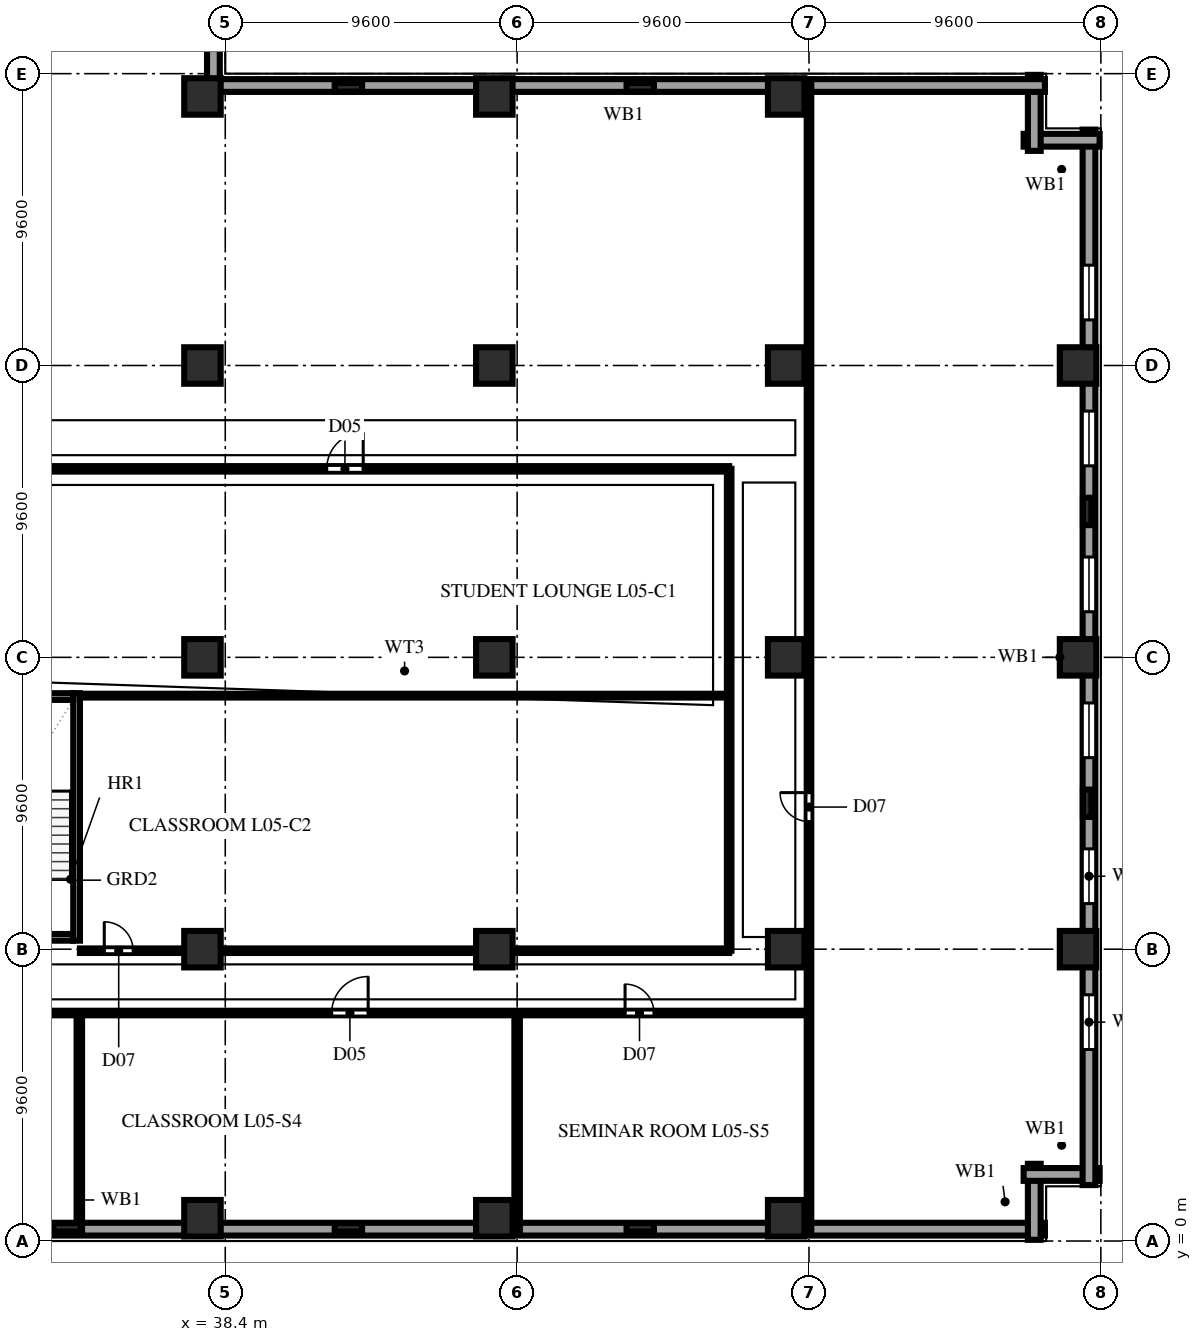
"""IFC4 building model, lengths in metres.
Left out: names, types, materials, properties, quantities, classifications, styles, units other than length and angle.
Written with IfcOpenShell. Run it as: python <this file> out.ifc"""

import sys

from ifc_helpers import new_model, si_unit, direction, frame, frame_2d, origin, origin_2d, place, context, subcontext, project, spatial, rectangle, extrude, element, fill, save


model = new_model("IFC4")
c1 = context("Model", 3, precision=1e-05, world=origin(), true_north=direction((0.0, 1.0)))
c2 = subcontext(c1, "Body", "Model", "MODEL_VIEW")
j1 = project(units=[si_unit("LENGTHUNIT", "METRE"), si_unit("PLANEANGLEUNIT", "RADIAN")], contexts=[c1])
p1 = place(None, origin())
s1 = spatial("IfcSite", under=j1, at=p1, CompositionType="ELEMENT")
p2 = place(p1, origin())
s2 = spatial("IfcBuilding", under=s1, at=p2, CompositionType="ELEMENT")
p3 = place(p2, frame((0.0, 0.0, 24.2)))
s3 = spatial("IfcBuildingStorey", under=s2, at=p3, CompositionType="ELEMENT", Elevation=24.2)
for number, where, z_axis, x_axis in (
    (1, (37.65, 0.75, 0.0), (0.0, 0.0, 1.0), (1.0, 0.0, 0.0)),
    (2, (37.65, 9.6, 0.0), (0.0, 0.0, 1.0), (1.0, 0.0, 0.0)),
    (3, (37.65, 19.2, 0.0), (0.0, 0.0, 1.0), (1.0, 0.0, 0.0)),
    (4, (37.65, 28.8, 0.0), (0.0, 0.0, 1.0), (1.0, 0.0, 0.0)),
    (5, (37.65, 37.65, 0.0), (0.0, 0.0, 1.0), (1.0, 0.0, 0.0)),
    (6, (47.25, 0.75, 0.0), (0.0, 0.0, 1.0), (1.0, 0.0, 0.0)),
    (7, (47.25, 9.6, 0.0), (0.0, 0.0, 1.0), (1.0, 0.0, 0.0)),
    (8, (47.25, 19.2, 0.0), (0.0, 0.0, 1.0), (1.0, 0.0, 0.0)),
    (9, (47.25, 28.8, 0.0), (0.0, 0.0, 1.0), (1.0, 0.0, 0.0)),
    (10, (47.25, 37.65, 0.0), (0.0, 0.0, 1.0), (1.0, 0.0, 0.0)),
    (11, (56.85, 0.75, 0.0), (0.0, 0.0, 1.0), (1.0, 0.0, 0.0)),
    (12, (56.85, 9.6, 0.0), (0.0, 0.0, 1.0), (1.0, 0.0, 0.0)),
    (13, (56.85, 19.2, 0.0), (0.0, 0.0, 1.0), (1.0, 0.0, 0.0)),
    (14, (56.85, 28.8, 0.0), (0.0, 0.0, 1.0), (1.0, 0.0, 0.0)),
    (15, (56.85, 37.65, 0.0), (0.0, 0.0, 1.0), (1.0, 0.0, 0.0)),
    (16, (66.45, 9.6, 0.0), (0.0, 0.0, 1.0), (1.0, 0.0, 0.0)),
    (17, (66.45, 19.2, 0.0), (0.0, 0.0, 1.0), (1.0, 0.0, 0.0)),
    (18, (66.45, 28.8, 0.0), (0.0, 0.0, 1.0), (1.0, 0.0, 0.0)),
):
    element("IfcColumn", number, at=place(p3, frame(where, z_axis=z_axis, x_axis=x_axis)), inside=s3, PredefinedType="COLUMN", context=c2, shape_type="SweptSolid", body=[
        extrude(rectangle(XDim=1.2, YDim=1.2, at=origin_2d()), origin(), (0.0, 0.0, 1.0), 3.8),
    ])
for number, where, z_axis, x_axis in (
    (19, (33.2, 0.45, 0.0), (0.0, 0.0, 1.0), (1.0, 0.0, 0.0)),
    (20, (42.45, 0.45, 0.0), (0.0, 0.0, 1.0), (1.0, 0.0, 0.0)),
    (21, (52.05, 0.45, 0.0), (0.0, 0.0, 1.0), (1.0, 0.0, 0.0)),
    (22, (66.75, 14.4, 0.0), (0.0, 0.0, 1.0), (0.0, 1.0, 0.0)),
    (23, (66.75, 24.0, 0.0), (0.0, 0.0, 1.0), (0.0, 1.0, 0.0)),
    (24, (42.45, 37.95, 0.0), (0.0, 0.0, 1.0), (1.0, 0.0, 0.0)),
    (25, (52.05, 37.95, 0.0), (0.0, 0.0, 1.0), (1.0, 0.0, 0.0)),
):
    element("IfcColumn", number, at=place(p3, frame(where, z_axis=z_axis, x_axis=x_axis)), inside=s3, PredefinedType="PILASTER", context=c2, shape_type="SweptSolid", body=[
        extrude(rectangle(XDim=0.9, YDim=0.28, at=origin_2d()), origin(), (0.0, 0.0, 1.0), 3.8),
    ])
p4 = place(p3, frame((1.84, 0.39, 0.0), z_axis=(0.0, 0.0, 1.0), x_axis=(1.0, 0.0, 0.0)))
e26 = element("IfcWall", 26, at=p4, inside=s3, PredefinedType="SOLIDWALL", context=c2, shape_type="SweptSolid", body=[
    extrude(rectangle(XDim=63.52, YDim=0.42, at=frame_2d((31.76, 0.0))), origin(), (0.0, 0.0, 1.0), 3.54),
])
p5 = place(p4, frame((4.16, 0.0, 0.85)))
e27 = element("IfcOpeningElement", 27, at=p5, cuts=e26, PredefinedType="OPENING", context=c2, shape_type="SweptSolid", body=[
    extrude(rectangle(XDim=2.4, YDim=1.85, at=frame_2d((1.2, 0.925))), frame((0.0, 0.222, 0.0), z_axis=(0.0, -1.0, 0.0), x_axis=(1.0, 0.0, 0.0)), (0.0, 0.0, 1.0), 0.444),
])
p6 = place(p4, frame((8.96, 0.0, 0.85)))
e28 = element("IfcOpeningElement", 28, at=p6, cuts=e26, PredefinedType="OPENING", context=c2, shape_type="SweptSolid", body=[
    extrude(rectangle(XDim=2.4, YDim=1.85, at=frame_2d((1.2, 0.925))), frame((0.0, 0.222, 0.0), z_axis=(0.0, -1.0, 0.0), x_axis=(1.0, 0.0, 0.0)), (0.0, 0.0, 1.0), 0.444),
])
p7 = place(p4, frame((13.76, 0.0, 0.85)))
e29 = element("IfcOpeningElement", 29, at=p7, cuts=e26, PredefinedType="OPENING", context=c2, shape_type="SweptSolid", body=[
    extrude(rectangle(XDim=2.4, YDim=1.85, at=frame_2d((1.2, 0.925))), frame((0.0, 0.222, 0.0), z_axis=(0.0, -1.0, 0.0), x_axis=(1.0, 0.0, 0.0)), (0.0, 0.0, 1.0), 0.444),
])
p8 = place(p4, frame((18.56, 0.0, 0.85)))
e30 = element("IfcOpeningElement", 30, at=p8, cuts=e26, PredefinedType="OPENING", context=c2, shape_type="SweptSolid", body=[
    extrude(rectangle(XDim=2.4, YDim=1.85, at=frame_2d((1.2, 0.925))), frame((0.0, 0.222, 0.0), z_axis=(0.0, -1.0, 0.0), x_axis=(1.0, 0.0, 0.0)), (0.0, 0.0, 1.0), 0.444),
])
p9 = place(p4, frame((23.36, 0.0, 0.85)))
e31 = element("IfcOpeningElement", 31, at=p9, cuts=e26, PredefinedType="OPENING", context=c2, shape_type="SweptSolid", body=[
    extrude(rectangle(XDim=2.4, YDim=1.85, at=frame_2d((1.2, 0.925))), frame((0.0, 0.222, 0.0), z_axis=(0.0, -1.0, 0.0), x_axis=(1.0, 0.0, 0.0)), (0.0, 0.0, 1.0), 0.444),
])
p10 = place(p4, frame((28.16, 0.0, 0.85)))
e32 = element("IfcOpeningElement", 32, at=p10, cuts=e26, PredefinedType="OPENING", context=c2, shape_type="SweptSolid", body=[
    extrude(rectangle(XDim=2.4, YDim=1.85, at=frame_2d((1.2, 0.925))), frame((0.0, 0.222, 0.0), z_axis=(0.0, -1.0, 0.0), x_axis=(1.0, 0.0, 0.0)), (0.0, 0.0, 1.0), 0.444),
])
for number, where, z_axis, x_axis in (
    (33, (65.01, 0.04, 0.0), (0.0, 0.0, 1.0), (0.0, 1.0, 0.0)),
    (34, (64.66, 2.19, 0.0), (0.0, 0.0, 1.0), (1.0, 0.0, 0.0)),
):
    element("IfcWall", number, at=place(p3, frame(where, z_axis=z_axis, x_axis=x_axis)), inside=s3, PredefinedType="SOLIDWALL", context=c2, shape_type="SweptSolid", body=[
        extrude(rectangle(XDim=2.5, YDim=0.42, at=frame_2d((1.25, 0.0))), origin(), (0.0, 0.0, 1.0), 3.54),
    ])
p11 = place(p3, frame((66.81, 1.84, 0.0), z_axis=(0.0, 0.0, 1.0), x_axis=(0.0, 1.0, 0.0)))
e35 = element("IfcWall", 35, at=p11, inside=s3, PredefinedType="SOLIDWALL", context=c2, shape_type="SweptSolid", body=[
    extrude(rectangle(XDim=34.72, YDim=0.42, at=frame_2d((17.36, 0.0))), origin(), (0.0, 0.0, 1.0), 3.54),
])
p12 = place(p11, frame((4.46, 0.0, 0.85)))
e36 = element("IfcOpeningElement", 36, at=p12, cuts=e35, PredefinedType="OPENING", context=c2, shape_type="SweptSolid", body=[
    extrude(rectangle(XDim=1.8, YDim=1.85, at=frame_2d((0.9, 0.925))), frame((0.0, 0.222, 0.0), z_axis=(0.0, -1.0, 0.0), x_axis=(1.0, 0.0, 0.0)), (0.0, 0.0, 1.0), 0.444),
])
p13 = place(p11, frame((9.26, 0.0, 0.85)))
e37 = element("IfcOpeningElement", 37, at=p13, cuts=e35, PredefinedType="OPENING", context=c2, shape_type="SweptSolid", body=[
    extrude(rectangle(XDim=1.8, YDim=1.85, at=frame_2d((0.9, 0.925))), frame((0.0, 0.222, 0.0), z_axis=(0.0, -1.0, 0.0), x_axis=(1.0, 0.0, 0.0)), (0.0, 0.0, 1.0), 0.444),
])
p14 = place(p11, frame((14.06, 0.0, 0.85)))
e38 = element("IfcOpeningElement", 38, at=p14, cuts=e35, PredefinedType="OPENING", context=c2, shape_type="SweptSolid", body=[
    extrude(rectangle(XDim=1.8, YDim=1.85, at=frame_2d((0.9, 0.925))), frame((0.0, 0.222, 0.0), z_axis=(0.0, -1.0, 0.0), x_axis=(1.0, 0.0, 0.0)), (0.0, 0.0, 1.0), 0.444),
])
p15 = place(p11, frame((18.86, 0.0, 0.85)))
e39 = element("IfcOpeningElement", 39, at=p15, cuts=e35, PredefinedType="OPENING", context=c2, shape_type="SweptSolid", body=[
    extrude(rectangle(XDim=1.8, YDim=1.85, at=frame_2d((0.9, 0.925))), frame((0.0, 0.222, 0.0), z_axis=(0.0, -1.0, 0.0), x_axis=(1.0, 0.0, 0.0)), (0.0, 0.0, 1.0), 0.444),
])
p16 = place(p11, frame((23.66, 0.0, 0.85)))
e40 = element("IfcOpeningElement", 40, at=p16, cuts=e35, PredefinedType="OPENING", context=c2, shape_type="SweptSolid", body=[
    extrude(rectangle(XDim=1.8, YDim=1.85, at=frame_2d((0.9, 0.925))), frame((0.0, 0.222, 0.0), z_axis=(0.0, -1.0, 0.0), x_axis=(1.0, 0.0, 0.0)), (0.0, 0.0, 1.0), 0.444),
])
p17 = place(p11, frame((28.46, 0.0, 0.85)))
e41 = element("IfcOpeningElement", 41, at=p17, cuts=e35, PredefinedType="OPENING", context=c2, shape_type="SweptSolid", body=[
    extrude(rectangle(XDim=1.8, YDim=1.85, at=frame_2d((0.9, 0.925))), frame((0.0, 0.222, 0.0), z_axis=(0.0, -1.0, 0.0), x_axis=(1.0, 0.0, 0.0)), (0.0, 0.0, 1.0), 0.444),
])
for number, where, z_axis, x_axis in (
    (42, (67.16, 36.21, 0.0), (0.0, 0.0, 1.0), (-1.0, 0.0, 0.0)),
    (43, (65.01, 35.86, 0.0), (0.0, 0.0, 1.0), (0.0, 1.0, 0.0)),
):
    element("IfcWall", number, at=place(p3, frame(where, z_axis=z_axis, x_axis=x_axis)), inside=s3, PredefinedType="SOLIDWALL", context=c2, shape_type="SweptSolid", body=[
        extrude(rectangle(XDim=2.5, YDim=0.42, at=frame_2d((1.25, 0.0))), origin(), (0.0, 0.0, 1.0), 3.54),
    ])
for number, where, z_axis, x_axis in (
    (44, (65.36, 38.01, 0.0), (0.0, 0.0, 1.0), (-1.0, 0.0, 0.0)),
    (45, (38.01, 37.66, 0.0), (0.0, 0.0, 1.0), (0.0, 1.0, 0.0)),
):
    element("IfcWall", number, at=place(p3, frame(where, z_axis=z_axis, x_axis=x_axis)), inside=s3, PredefinedType="SOLIDWALL", context=c2, shape_type="SweptSolid", body=[
        extrude(rectangle(XDim=27.7, YDim=0.42, at=frame_2d((13.85, 0.0))), origin(), (0.0, 0.0, 1.0), 3.54),
    ])
p18 = place(p3, frame((29.75, 9.99, 0.0), z_axis=(0.0, 0.0, 1.0), x_axis=(1.0, 0.0, 0.0)))
e46 = element("IfcWall", 46, at=p18, inside=s3, PredefinedType="SOLIDWALL", context=c2, shape_type="SweptSolid", body=[
    extrude(rectangle(XDim=3.65, YDim=0.22, at=frame_2d((1.825, 0.0))), origin(), (0.0, 0.0, 1.0), 3.54),
])
p19 = place(p18, frame((1.24, 0.0, 0.0)))
e47 = element("IfcOpeningElement", 47, at=p19, cuts=e46, PredefinedType="OPENING", context=c2, shape_type="SweptSolid", body=[
    extrude(rectangle(XDim=1.1, YDim=2.2, at=frame_2d((0.55, 1.1))), frame((0.0, 0.122, 0.0), z_axis=(0.0, -1.0, 0.0), x_axis=(1.0, 0.0, 0.0)), (0.0, 0.0, 1.0), 0.244),
])
p20 = place(p3, frame((33.51, 9.88, 0.0), z_axis=(0.0, 0.0, 1.0), x_axis=(0.0, 1.0, 0.0)))
e48 = element("IfcWall", 48, at=p20, inside=s3, PredefinedType="SOLIDWALL", context=c2, shape_type="SweptSolid", body=[
    extrude(rectangle(XDim=8.14, YDim=0.22, at=frame_2d((4.07, 0.0))), origin(), (0.0, 0.0, 1.0), 3.54),
])
p21 = place(p3, frame((29.75, 17.91, 0.0), z_axis=(0.0, 0.0, 1.0), x_axis=(1.0, 0.0, 0.0)))
e49 = element("IfcWall", 49, at=p21, inside=s3, PredefinedType="SOLIDWALL", context=c2, shape_type="SweptSolid", body=[
    extrude(rectangle(XDim=3.65, YDim=0.22, at=frame_2d((1.825, 0.0))), origin(), (0.0, 0.0, 1.0), 3.54),
])
for number, where, z_axis, x_axis in (
    (50, (33.6, 0.22, 0.0), (0.0, 0.0, 1.0), (0.0, 1.0, 0.0)),
    (51, (48.0, 0.22, 0.0), (0.0, 0.0, 1.0), (0.0, 1.0, 0.0)),
):
    element("IfcWall", number, at=place(p3, frame(where, z_axis=z_axis, x_axis=x_axis)), inside=s3, PredefinedType="PARTITIONING", context=c2, shape_type="SweptSolid", body=[
        extrude(rectangle(XDim=7.28, YDim=0.18, at=frame_2d((3.64, 0.0))), origin(), (0.0, 0.0, 1.0), 3.54),
    ])
p22 = place(p3, frame((0.22, 7.5, 0.0), z_axis=(0.0, 0.0, 1.0), x_axis=(1.0, 0.0, 0.0)))
e52 = element("IfcWall", 52, at=p22, inside=s3, PredefinedType="PARTITIONING", context=c2, shape_type="SweptSolid", body=[
    extrude(rectangle(XDim=57.38, YDim=0.15, at=frame_2d((28.69, 0.0))), origin(), (0.0, 0.0, 1.0), 3.54),
])
p23 = place(p22, frame((11.43, 0.0, 0.0)))
e53 = element("IfcOpeningElement", 53, at=p23, cuts=e52, PredefinedType="OPENING", context=c2, shape_type="SweptSolid", body=[
    extrude(rectangle(XDim=2.0, YDim=2.3, at=frame_2d((1.0, 1.15))), frame((0.0, 0.087, 0.0), z_axis=(0.0, -1.0, 0.0), x_axis=(1.0, 0.0, 0.0)), (0.0, 0.0, 1.0), 0.174),
])
p24 = place(p22, frame((14.73, 0.0, 0.0)))
e54 = element("IfcOpeningElement", 54, at=p24, cuts=e52, PredefinedType="OPENING", context=c2, shape_type="SweptSolid", body=[
    extrude(rectangle(XDim=1.2, YDim=2.2, at=frame_2d((0.6, 1.1))), frame((0.0, 0.087, 0.0), z_axis=(0.0, -1.0, 0.0), x_axis=(1.0, 0.0, 0.0)), (0.0, 0.0, 1.0), 0.174),
])
p25 = place(p22, frame((24.33, 0.0, 0.0)))
e55 = element("IfcOpeningElement", 55, at=p25, cuts=e52, PredefinedType="OPENING", context=c2, shape_type="SweptSolid", body=[
    extrude(rectangle(XDim=1.2, YDim=2.2, at=frame_2d((0.6, 1.1))), frame((0.0, 0.087, 0.0), z_axis=(0.0, -1.0, 0.0), x_axis=(1.0, 0.0, 0.0)), (0.0, 0.0, 1.0), 0.174),
])
p26 = place(p22, frame((41.68, 0.0, 0.0)))
e56 = element("IfcOpeningElement", 56, at=p26, cuts=e52, PredefinedType="OPENING", context=c2, shape_type="SweptSolid", body=[
    extrude(rectangle(XDim=1.2, YDim=2.2, at=frame_2d((0.6, 1.1))), frame((0.0, 0.087, 0.0), z_axis=(0.0, -1.0, 0.0), x_axis=(1.0, 0.0, 0.0)), (0.0, 0.0, 1.0), 0.174),
])
p27 = place(p22, frame((51.33, 0.0, 0.0)))
e57 = element("IfcOpeningElement", 57, at=p27, cuts=e52, PredefinedType="OPENING", context=c2, shape_type="SweptSolid", body=[
    extrude(rectangle(XDim=0.95, YDim=2.15, at=frame_2d((0.475, 1.075))), frame((0.0, 0.087, 0.0), z_axis=(0.0, -1.0, 0.0), x_axis=(1.0, 0.0, 0.0)), (0.0, 0.0, 1.0), 0.174),
])
p28 = place(p3, frame((57.6, 0.22, 0.0), z_axis=(0.0, 0.0, 1.0), x_axis=(0.0, 1.0, 0.0)))
e58 = element("IfcWall", 58, at=p28, inside=s3, PredefinedType="PARTITIONING", context=c2, shape_type="SweptSolid", body=[
    extrude(rectangle(XDim=37.96, YDim=0.15, at=frame_2d((18.98, 0.0))), origin(), (0.0, 0.0, 1.0), 3.54),
])
p29 = place(p28, frame((13.58, 0.0, 0.0)))
e59 = element("IfcOpeningElement", 59, at=p29, cuts=e58, PredefinedType="OPENING", context=c2, shape_type="SweptSolid", body=[
    extrude(rectangle(XDim=0.95, YDim=2.15, at=frame_2d((0.475, 1.075))), frame((0.0, 0.087, 0.0), z_axis=(0.0, -1.0, 0.0), x_axis=(1.0, 0.0, 0.0)), (0.0, 0.0, 1.0), 0.174),
])
p30 = place(p3, frame((19.28, 25.4, 0.0), z_axis=(0.0, 0.0, 1.0), x_axis=(1.0, 0.0, 0.0)))
e60 = element("IfcWall", 60, at=p30, inside=s3, PredefinedType="PARTITIONING", context=c2, shape_type="SweptSolid", body=[
    extrude(rectangle(XDim=35.695, YDim=0.18, at=frame_2d((17.848, 0.0))), origin(), (0.0, 0.0, 1.0), 3.54),
])
p31 = place(p30, frame((22.457, 0.0, 0.0)))
e61 = element("IfcOpeningElement", 61, at=p31, cuts=e60, PredefinedType="OPENING", context=c2, shape_type="SweptSolid", body=[
    extrude(rectangle(XDim=1.2, YDim=2.2, at=frame_2d((0.6, 1.1))), frame((0.0, 0.102, 0.0), z_axis=(0.0, -1.0, 0.0), x_axis=(1.0, 0.0, 0.0)), (0.0, 0.0, 1.0), 0.204),
])
p32 = place(p3, frame((33.62, 17.94, 0.0), z_axis=(0.0, 0.0, 1.0), x_axis=(1.0, 0.0, 0.0)))
e62 = element("IfcWall", 62, at=p32, inside=s3, PredefinedType="PARTITIONING", context=c2, shape_type="SweptSolid", body=[
    extrude(rectangle(XDim=21.355, YDim=0.125, at=frame_2d((10.677, 0.0))), origin(), (0.0, 0.0, 1.0), 3.54),
])
p33 = place(p3, frame((33.62, 9.55, 0.0), z_axis=(0.0, 0.0, 1.0), x_axis=(1.0, 0.0, 0.0)))
e63 = element("IfcWall", 63, at=p33, inside=s3, PredefinedType="PARTITIONING", context=c2, shape_type="SweptSolid", body=[
    extrude(rectangle(XDim=21.355, YDim=0.15, at=frame_2d((10.677, 0.0))), origin(), (0.0, 0.0, 1.0), 2.923),
])
p34 = place(p33, frame((0.8, 0.0, 0.0)))
e64 = element("IfcOpeningElement", 64, at=p34, cuts=e63, PredefinedType="OPENING", context=c2, shape_type="SweptSolid", body=[
    extrude(rectangle(XDim=0.95, YDim=2.15, at=frame_2d((0.475, 1.075))), frame((0.0, 0.087, 0.0), z_axis=(0.0, -1.0, 0.0), x_axis=(1.0, 0.0, 0.0)), (0.0, 0.0, 1.0), 0.174),
])
p35 = place(p3, frame((54.975, 9.55, 0.0), z_axis=(0.0, 0.0, 1.0), x_axis=(0.0, 1.0, 0.0)))
e65 = element("IfcWall", 65, at=p35, inside=s3, PredefinedType="PARTITIONING", context=c2, shape_type="SweptSolid", body=[
    extrude(rectangle(XDim=15.85, YDim=0.15, at=frame_2d((7.925, 0.0))), origin(), (0.0, 0.0, 1.0), 3.54),
])
p36 = place(p12, origin())
e66 = element("IfcWindow", 66, at=p36, inside=s3, PartitioningType="DOUBLE_PANEL_VERTICAL", PredefinedType="WINDOW", context=c2, shape_type="SweptSolid", body=[
    extrude(rectangle(XDim=1.8, YDim=1.85, at=frame_2d((0.9, 0.925))), frame((0.0, 0.11, 0.0), z_axis=(0.0, -1.0, 0.0), x_axis=(1.0, 0.0, 0.0)), (0.0, 0.0, 1.0), 0.06),
])
fill(e36, e66)
p37 = place(p13, origin())
e67 = element("IfcWindow", 67, at=p37, inside=s3, PartitioningType="DOUBLE_PANEL_VERTICAL", PredefinedType="WINDOW", context=c2, shape_type="SweptSolid", body=[
    extrude(rectangle(XDim=1.8, YDim=1.85, at=frame_2d((0.9, 0.925))), frame((0.0, 0.11, 0.0), z_axis=(0.0, -1.0, 0.0), x_axis=(1.0, 0.0, 0.0)), (0.0, 0.0, 1.0), 0.06),
])
fill(e37, e67)
p38 = place(p14, origin())
e68 = element("IfcWindow", 68, at=p38, inside=s3, PartitioningType="DOUBLE_PANEL_VERTICAL", PredefinedType="WINDOW", context=c2, shape_type="SweptSolid", body=[
    extrude(rectangle(XDim=1.8, YDim=1.85, at=frame_2d((0.9, 0.925))), frame((0.0, 0.11, 0.0), z_axis=(0.0, -1.0, 0.0), x_axis=(1.0, 0.0, 0.0)), (0.0, 0.0, 1.0), 0.06),
])
fill(e38, e68)
p39 = place(p15, origin())
e69 = element("IfcWindow", 69, at=p39, inside=s3, PartitioningType="DOUBLE_PANEL_VERTICAL", PredefinedType="WINDOW", context=c2, shape_type="SweptSolid", body=[
    extrude(rectangle(XDim=1.8, YDim=1.85, at=frame_2d((0.9, 0.925))), frame((0.0, 0.11, 0.0), z_axis=(0.0, -1.0, 0.0), x_axis=(1.0, 0.0, 0.0)), (0.0, 0.0, 1.0), 0.06),
])
fill(e39, e69)
p40 = place(p16, origin())
e70 = element("IfcWindow", 70, at=p40, inside=s3, PartitioningType="DOUBLE_PANEL_VERTICAL", PredefinedType="WINDOW", context=c2, shape_type="SweptSolid", body=[
    extrude(rectangle(XDim=1.8, YDim=1.85, at=frame_2d((0.9, 0.925))), frame((0.0, 0.11, 0.0), z_axis=(0.0, -1.0, 0.0), x_axis=(1.0, 0.0, 0.0)), (0.0, 0.0, 1.0), 0.06),
])
fill(e40, e70)
p41 = place(p17, origin())
e71 = element("IfcWindow", 71, at=p41, inside=s3, PartitioningType="DOUBLE_PANEL_VERTICAL", PredefinedType="WINDOW", context=c2, shape_type="SweptSolid", body=[
    extrude(rectangle(XDim=1.8, YDim=1.85, at=frame_2d((0.9, 0.925))), frame((0.0, 0.11, 0.0), z_axis=(0.0, -1.0, 0.0), x_axis=(1.0, 0.0, 0.0)), (0.0, 0.0, 1.0), 0.06),
])
fill(e41, e71)
p42 = place(p26, origin())
e72 = element("IfcDoor", 72, at=p42, inside=s3, OperationType="SINGLE_SWING_RIGHT", PredefinedType="DOOR", context=c2, shape_type="SweptSolid", body=[
    extrude(rectangle(XDim=1.2, YDim=2.2, at=frame_2d((0.6, 1.1))), frame((0.0, 0.025, 0.0), z_axis=(0.0, -1.0, 0.0), x_axis=(1.0, 0.0, 0.0)), (0.0, 0.0, 1.0), 0.05),
])
fill(e56, e72)
p43 = place(p27, origin())
e73 = element("IfcDoor", 73, at=p43, inside=s3, OperationType="SINGLE_SWING_LEFT", PredefinedType="DOOR", context=c2, shape_type="SweptSolid", body=[
    extrude(rectangle(XDim=0.95, YDim=2.15, at=frame_2d((0.475, 1.075))), frame((0.0, 0.025, 0.0), z_axis=(0.0, -1.0, 0.0), x_axis=(1.0, 0.0, 0.0)), (0.0, 0.0, 1.0), 0.05),
])
fill(e57, e73)
p44 = place(p29, origin())
e74 = element("IfcDoor", 74, at=p44, inside=s3, OperationType="SINGLE_SWING_RIGHT", PredefinedType="DOOR", context=c2, shape_type="SweptSolid", body=[
    extrude(rectangle(XDim=0.95, YDim=2.15, at=frame_2d((0.475, 1.075))), frame((0.0, 0.025, 0.0), z_axis=(0.0, -1.0, 0.0), x_axis=(1.0, 0.0, 0.0)), (0.0, 0.0, 1.0), 0.05),
])
fill(e59, e74)
p45 = place(p31, origin())
e75 = element("IfcDoor", 75, at=p45, inside=s3, OperationType="SINGLE_SWING_RIGHT", PredefinedType="DOOR", context=c2, shape_type="SweptSolid", body=[
    extrude(rectangle(XDim=1.2, YDim=2.2, at=frame_2d((0.6, 1.1))), frame((0.0, 0.025, 0.0), z_axis=(0.0, -1.0, 0.0), x_axis=(1.0, 0.0, 0.0)), (0.0, 0.0, 1.0), 0.05),
])
fill(e61, e75)
p46 = place(p34, origin())
e76 = element("IfcDoor", 76, at=p46, inside=s3, OperationType="SINGLE_SWING_LEFT", PredefinedType="DOOR", context=c2, shape_type="SweptSolid", body=[
    extrude(rectangle(XDim=0.95, YDim=2.15, at=frame_2d((0.475, 1.075))), frame((0.0, 0.025, 0.0), z_axis=(0.0, -1.0, 0.0), x_axis=(1.0, 0.0, 0.0)), (0.0, 0.0, 1.0), 0.05),
])
fill(e64, e76)
save(model, sys.argv[1])
